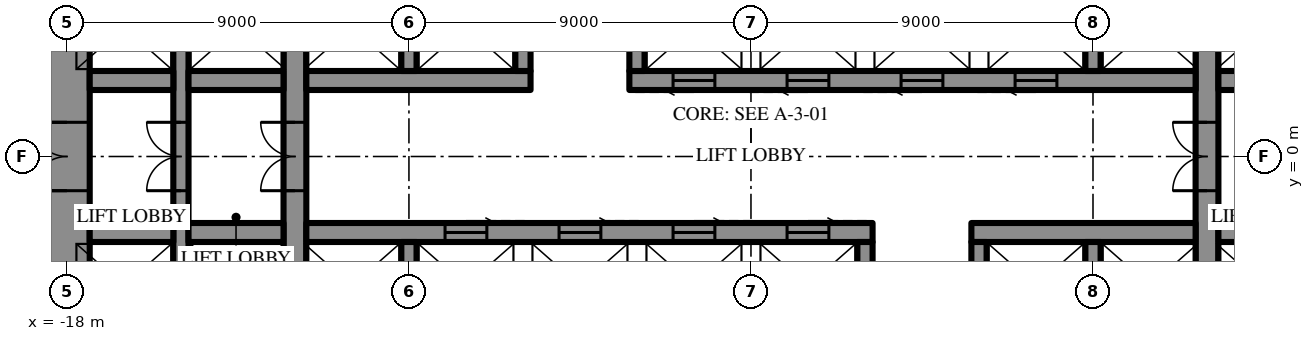
"""IFC4 building model, lengths in metres.
Left out: names, types, materials, properties, quantities, classifications, styles, units other than length and angle.
Written with IfcOpenShell. Run it as: python <this file> out.ifc"""

import sys

from ifc_helpers import new_model, si_unit, direction, frame, frame_2d, origin, place, context, subcontext, project, spatial, rectangle, extrude, element, fill, save


model = new_model("IFC4")
c1 = context("Model", 3, precision=1e-05, world=origin(), true_north=direction((0.0, 1.0)))
c2 = subcontext(c1, "Body", "Model", "MODEL_VIEW")
j1 = project(units=[si_unit("LENGTHUNIT", "METRE"), si_unit("PLANEANGLEUNIT", "RADIAN")], contexts=[c1])
p1 = place(None, origin())
s1 = spatial("IfcSite", under=j1, at=p1, CompositionType="ELEMENT")
p2 = place(p1, origin())
s2 = spatial("IfcBuilding", under=s1, at=p2, CompositionType="ELEMENT")
p3 = place(p2, frame((0.0, 0.0, 44.5)))
s3 = spatial("IfcBuildingStorey", under=s2, at=p3, CompositionType="ELEMENT", Elevation=44.5)
p4 = place(p3, frame((-18.0, 10.7, 0.0), z_axis=(0.0, 0.0, 1.0), x_axis=(0.0, -1.0, 0.0)))
e1 = element("IfcWall", 1, at=p4, inside=s3, PredefinedType="SHEAR", context=c2, shape_type="SweptSolid", body=[
    extrude(rectangle(XDim=21.4, YDim=1.2, at=frame_2d((10.7, 0.0))), origin(), (0.0, 0.0, 1.0), 4.2),
])
p5 = place(p4, frame((9.8, 0.0, 0.0)))
e2 = element("IfcOpeningElement", 2, at=p5, cuts=e1, PredefinedType="OPENING", context=c2, shape_type="SweptSolid", body=[
    extrude(rectangle(XDim=1.8, YDim=2.4, at=frame_2d((0.9, 1.2))), frame((0.0, 0.61, 0.0), z_axis=(0.0, -1.0, 0.0), x_axis=(1.0, 0.0, 0.0)), (0.0, 0.0, 1.0), 1.22),
])
p6 = place(p3, frame((12.0, -10.7, 0.0), z_axis=(0.0, 0.0, 1.0), x_axis=(0.0, 1.0, 0.0)))
e3 = element("IfcWall", 3, at=p6, inside=s3, PredefinedType="SHEAR", context=c2, shape_type="SweptSolid", body=[
    extrude(rectangle(XDim=21.4, YDim=0.6, at=frame_2d((10.7, 0.0))), origin(), (0.0, 0.0, 1.0), 4.2),
])
p7 = place(p6, frame((9.8, 0.0, 0.0)))
e4 = element("IfcOpeningElement", 4, at=p7, cuts=e3, PredefinedType="OPENING", context=c2, shape_type="SweptSolid", body=[
    extrude(rectangle(XDim=1.8, YDim=2.4, at=frame_2d((0.9, 1.2))), frame((0.0, 0.31, 0.0), z_axis=(0.0, -1.0, 0.0), x_axis=(1.0, 0.0, 0.0)), (0.0, 0.0, 1.0), 0.62),
])
p8 = place(p3, frame((-12.0, -10.7, 0.0), z_axis=(0.0, 0.0, 1.0), x_axis=(0.0, 1.0, 0.0)))
e5 = element("IfcWall", 5, at=p8, inside=s3, PredefinedType="SHEAR", context=c2, shape_type="SweptSolid", body=[
    extrude(rectangle(XDim=21.4, YDim=0.6, at=frame_2d((10.7, 0.0))), origin(), (0.0, 0.0, 1.0), 4.2),
])
p9 = place(p8, frame((9.8, 0.0, 0.0)))
e6 = element("IfcOpeningElement", 6, at=p9, cuts=e5, PredefinedType="OPENING", context=c2, shape_type="SweptSolid", body=[
    extrude(rectangle(XDim=1.8, YDim=2.4, at=frame_2d((0.9, 1.2))), frame((0.0, 0.31, 0.0), z_axis=(0.0, -1.0, 0.0), x_axis=(1.0, 0.0, 0.0)), (0.0, 0.0, 1.0), 0.62),
])
p10 = place(p3, frame((-15.0, -10.7, 0.0), z_axis=(0.0, 0.0, 1.0), x_axis=(0.0, 1.0, 0.0)))
e7 = element("IfcWall", 7, at=p10, inside=s3, PredefinedType="SHEAR", context=c2, shape_type="SweptSolid", body=[
    extrude(rectangle(XDim=21.4, YDim=0.4, at=frame_2d((10.7, 0.0))), origin(), (0.0, 0.0, 1.0), 4.2),
])
p11 = place(p10, frame((9.8, 0.0, 0.0)))
e8 = element("IfcOpeningElement", 8, at=p11, cuts=e7, PredefinedType="OPENING", context=c2, shape_type="SweptSolid", body=[
    extrude(rectangle(XDim=1.8, YDim=2.4, at=frame_2d((0.9, 1.2))), frame((0.0, 0.21, 0.0), z_axis=(0.0, -1.0, 0.0), x_axis=(1.0, 0.0, 0.0)), (0.0, 0.0, 1.0), 0.42),
])
p12 = place(p3, frame((-17.4, 2.0, 0.0), z_axis=(0.0, 0.0, 1.0), x_axis=(1.0, 0.0, 0.0)))
e9 = element("IfcWall", 9, at=p12, inside=s3, PredefinedType="SHEAR", context=c2, shape_type="SweptSolid", body=[
    extrude(rectangle(XDim=2.2, YDim=0.5, at=frame_2d((1.1, 0.0))), origin(), (0.0, 0.0, 1.0), 4.2),
])
p13 = place(p3, frame((-14.8, 2.0, 0.0), z_axis=(0.0, 0.0, 1.0), x_axis=(1.0, 0.0, 0.0)))
e10 = element("IfcWall", 10, at=p13, inside=s3, PredefinedType="SHEAR", context=c2, shape_type="SweptSolid", body=[
    extrude(rectangle(XDim=2.5, YDim=0.5, at=frame_2d((1.25, 0.0))), origin(), (0.0, 0.0, 1.0), 4.2),
])
p14 = place(p3, frame((-11.7, 2.0, 0.0), z_axis=(0.0, 0.0, 1.0), x_axis=(1.0, 0.0, 0.0)))
e11 = element("IfcWall", 11, at=p14, inside=s3, PredefinedType="SHEAR", context=c2, shape_type="SweptSolid", body=[
    extrude(rectangle(XDim=5.9, YDim=0.5, at=frame_2d((2.95, 0.0))), origin(), (0.0, 0.0, 1.0), 4.2),
])
p15 = place(p3, frame((-3.2, 2.0, 0.0), z_axis=(0.0, 0.0, 1.0), x_axis=(1.0, 0.0, 0.0)))
e12 = element("IfcWall", 12, at=p15, inside=s3, PredefinedType="SHEAR", context=c2, shape_type="SweptSolid", body=[
    extrude(rectangle(XDim=14.9, YDim=0.5, at=frame_2d((7.45, 0.0))), origin(), (0.0, 0.0, 1.0), 4.2),
])
p16 = place(p15, frame((1.15, 0.0, 0.0)))
e13 = element("IfcOpeningElement", 13, at=p16, cuts=e12, PredefinedType="OPENING", context=c2, shape_type="SweptSolid", body=[
    extrude(rectangle(XDim=1.1, YDim=2.2, at=frame_2d((0.55, 1.1))), frame((0.0, 0.26, 0.0), z_axis=(0.0, -1.0, 0.0), x_axis=(1.0, 0.0, 0.0)), (0.0, 0.0, 1.0), 0.52),
])
p17 = place(p15, frame((4.15, 0.0, 0.0)))
e14 = element("IfcOpeningElement", 14, at=p17, cuts=e12, PredefinedType="OPENING", context=c2, shape_type="SweptSolid", body=[
    extrude(rectangle(XDim=1.1, YDim=2.2, at=frame_2d((0.55, 1.1))), frame((0.0, 0.26, 0.0), z_axis=(0.0, -1.0, 0.0), x_axis=(1.0, 0.0, 0.0)), (0.0, 0.0, 1.0), 0.52),
])
p18 = place(p15, frame((7.15, 0.0, 0.0)))
e15 = element("IfcOpeningElement", 15, at=p18, cuts=e12, PredefinedType="OPENING", context=c2, shape_type="SweptSolid", body=[
    extrude(rectangle(XDim=1.1, YDim=2.2, at=frame_2d((0.55, 1.1))), frame((0.0, 0.26, 0.0), z_axis=(0.0, -1.0, 0.0), x_axis=(1.0, 0.0, 0.0)), (0.0, 0.0, 1.0), 0.52),
])
p19 = place(p15, frame((10.15, 0.0, 0.0)))
e16 = element("IfcOpeningElement", 16, at=p19, cuts=e12, PredefinedType="OPENING", context=c2, shape_type="SweptSolid", body=[
    extrude(rectangle(XDim=1.1, YDim=2.2, at=frame_2d((0.55, 1.1))), frame((0.0, 0.26, 0.0), z_axis=(0.0, -1.0, 0.0), x_axis=(1.0, 0.0, 0.0)), (0.0, 0.0, 1.0), 0.52),
])
p20 = place(p3, frame((12.3, 2.0, 0.0), z_axis=(0.0, 0.0, 1.0), x_axis=(1.0, 0.0, 0.0)))
e17 = element("IfcWall", 17, at=p20, inside=s3, PredefinedType="SHEAR", context=c2, shape_type="SweptSolid", body=[
    extrude(rectangle(XDim=2.5, YDim=0.5, at=frame_2d((1.25, 0.0))), origin(), (0.0, 0.0, 1.0), 4.2),
])
for number, where, z_axis, x_axis in (
    (18, (-9.0, 2.25, 0.0), (0.0, 0.0, 1.0), (0.0, 1.0, 0.0)),
    (19, (-6.0, 2.25, 0.0), (0.0, 0.0, 1.0), (0.0, 1.0, 0.0)),
    (20, (-3.0, 2.25, 0.0), (0.0, 0.0, 1.0), (0.0, 1.0, 0.0)),
    (21, (9.0, 2.25, 0.0), (0.0, 0.0, 1.0), (0.0, 1.0, 0.0)),
):
    element("IfcWall", number, at=place(p3, frame(where, z_axis=z_axis, x_axis=x_axis)), inside=s3, PredefinedType="SHEAR", context=c2, shape_type="SweptSolid", body=[
        extrude(rectangle(XDim=2.3, YDim=0.4, at=frame_2d((1.15, 0.0))), origin(), (0.0, 0.0, 1.0), 4.2),
    ])
p21 = place(p3, frame((14.8, -2.0, 0.0), z_axis=(0.0, 0.0, 1.0), x_axis=(-1.0, 0.0, 0.0)))
e22 = element("IfcWall", 22, at=p21, inside=s3, PredefinedType="SHEAR", context=c2, shape_type="SweptSolid", body=[
    extrude(rectangle(XDim=2.5, YDim=0.5, at=frame_2d((1.25, 0.0))), origin(), (0.0, 0.0, 1.0), 4.2),
])
p22 = place(p3, frame((11.7, -2.0, 0.0), z_axis=(0.0, 0.0, 1.0), x_axis=(-1.0, 0.0, 0.0)))
e23 = element("IfcWall", 23, at=p22, inside=s3, PredefinedType="SHEAR", context=c2, shape_type="SweptSolid", body=[
    extrude(rectangle(XDim=5.9, YDim=0.5, at=frame_2d((2.95, 0.0))), origin(), (0.0, 0.0, 1.0), 4.2),
])
p23 = place(p3, frame((3.2, -2.0, 0.0), z_axis=(0.0, 0.0, 1.0), x_axis=(-1.0, 0.0, 0.0)))
e24 = element("IfcWall", 24, at=p23, inside=s3, PredefinedType="SHEAR", context=c2, shape_type="SweptSolid", body=[
    extrude(rectangle(XDim=14.9, YDim=0.5, at=frame_2d((7.45, 0.0))), origin(), (0.0, 0.0, 1.0), 4.2),
])
p24 = place(p23, frame((1.15, 0.0, 0.0)))
e25 = element("IfcOpeningElement", 25, at=p24, cuts=e24, PredefinedType="OPENING", context=c2, shape_type="SweptSolid", body=[
    extrude(rectangle(XDim=1.1, YDim=2.2, at=frame_2d((0.55, 1.1))), frame((0.0, 0.26, 0.0), z_axis=(0.0, -1.0, 0.0), x_axis=(1.0, 0.0, 0.0)), (0.0, 0.0, 1.0), 0.52),
])
p25 = place(p23, frame((4.15, 0.0, 0.0)))
e26 = element("IfcOpeningElement", 26, at=p25, cuts=e24, PredefinedType="OPENING", context=c2, shape_type="SweptSolid", body=[
    extrude(rectangle(XDim=1.1, YDim=2.2, at=frame_2d((0.55, 1.1))), frame((0.0, 0.26, 0.0), z_axis=(0.0, -1.0, 0.0), x_axis=(1.0, 0.0, 0.0)), (0.0, 0.0, 1.0), 0.52),
])
p26 = place(p23, frame((7.15, 0.0, 0.0)))
e27 = element("IfcOpeningElement", 27, at=p26, cuts=e24, PredefinedType="OPENING", context=c2, shape_type="SweptSolid", body=[
    extrude(rectangle(XDim=1.1, YDim=2.2, at=frame_2d((0.55, 1.1))), frame((0.0, 0.26, 0.0), z_axis=(0.0, -1.0, 0.0), x_axis=(1.0, 0.0, 0.0)), (0.0, 0.0, 1.0), 0.52),
])
p27 = place(p23, frame((10.15, 0.0, 0.0)))
e28 = element("IfcOpeningElement", 28, at=p27, cuts=e24, PredefinedType="OPENING", context=c2, shape_type="SweptSolid", body=[
    extrude(rectangle(XDim=1.1, YDim=2.2, at=frame_2d((0.55, 1.1))), frame((0.0, 0.26, 0.0), z_axis=(0.0, -1.0, 0.0), x_axis=(1.0, 0.0, 0.0)), (0.0, 0.0, 1.0), 0.52),
])
p28 = place(p3, frame((-12.3, -2.0, 0.0), z_axis=(0.0, 0.0, 1.0), x_axis=(-1.0, 0.0, 0.0)))
e29 = element("IfcWall", 29, at=p28, inside=s3, PredefinedType="SHEAR", context=c2, shape_type="SweptSolid", body=[
    extrude(rectangle(XDim=2.5, YDim=0.5, at=frame_2d((1.25, 0.0))), origin(), (0.0, 0.0, 1.0), 4.2),
])
p29 = place(p3, frame((-15.2, -2.0, 0.0), z_axis=(0.0, 0.0, 1.0), x_axis=(-1.0, 0.0, 0.0)))
e30 = element("IfcWall", 30, at=p29, inside=s3, PredefinedType="SHEAR", context=c2, shape_type="SweptSolid", body=[
    extrude(rectangle(XDim=2.2, YDim=0.5, at=frame_2d((1.1, 0.0))), origin(), (0.0, 0.0, 1.0), 4.2),
])
for number, where, z_axis, x_axis in (
    (31, (9.0, -2.25, 0.0), (0.0, 0.0, 1.0), (0.0, -1.0, 0.0)),
    (32, (6.0, -2.25, 0.0), (0.0, 0.0, 1.0), (0.0, -1.0, 0.0)),
    (33, (3.0, -2.25, 0.0), (0.0, 0.0, 1.0), (0.0, -1.0, 0.0)),
    (34, (-9.0, -2.25, 0.0), (0.0, 0.0, 1.0), (0.0, -1.0, 0.0)),
):
    element("IfcWall", number, at=place(p3, frame(where, z_axis=z_axis, x_axis=x_axis)), inside=s3, PredefinedType="SHEAR", context=c2, shape_type="SweptSolid", body=[
        extrude(rectangle(XDim=2.3, YDim=0.4, at=frame_2d((1.15, 0.0))), origin(), (0.0, 0.0, 1.0), 4.2),
    ])
p30 = place(p5, frame((1.8, 0.0, 0.0), z_axis=(0.0, 0.0, 1.0), x_axis=(-1.0, 0.0, 0.0)))
e35 = element("IfcDoor", 35, at=p30, inside=s3, OperationType="DOUBLE_DOOR_SINGLE_SWING", PredefinedType="DOOR", context=c2, shape_type="SweptSolid", body=[
    extrude(rectangle(XDim=1.8, YDim=2.4, at=frame_2d((0.9, 1.2))), frame((0.0, 0.025, 0.0), z_axis=(0.0, -1.0, 0.0), x_axis=(1.0, 0.0, 0.0)), (0.0, 0.0, 1.0), 0.05),
])
fill(e2, e35)
p31 = place(p7, origin())
e36 = element("IfcDoor", 36, at=p31, inside=s3, OperationType="DOUBLE_DOOR_SINGLE_SWING", PredefinedType="DOOR", context=c2, shape_type="SweptSolid", body=[
    extrude(rectangle(XDim=1.8, YDim=2.4, at=frame_2d((0.9, 1.2))), frame((0.0, 0.025, 0.0), z_axis=(0.0, -1.0, 0.0), x_axis=(1.0, 0.0, 0.0)), (0.0, 0.0, 1.0), 0.05),
])
fill(e4, e36)
p32 = place(p9, origin())
e37 = element("IfcDoor", 37, at=p32, inside=s3, OperationType="DOUBLE_DOOR_SINGLE_SWING", PredefinedType="DOOR", context=c2, shape_type="SweptSolid", body=[
    extrude(rectangle(XDim=1.8, YDim=2.4, at=frame_2d((0.9, 1.2))), frame((0.0, 0.025, 0.0), z_axis=(0.0, -1.0, 0.0), x_axis=(1.0, 0.0, 0.0)), (0.0, 0.0, 1.0), 0.05),
])
fill(e6, e37)
p33 = place(p11, origin())
e38 = element("IfcDoor", 38, at=p33, inside=s3, OperationType="DOUBLE_DOOR_SINGLE_SWING", PredefinedType="DOOR", context=c2, shape_type="SweptSolid", body=[
    extrude(rectangle(XDim=1.8, YDim=2.4, at=frame_2d((0.9, 1.2))), frame((0.0, 0.025, 0.0), z_axis=(0.0, -1.0, 0.0), x_axis=(1.0, 0.0, 0.0)), (0.0, 0.0, 1.0), 0.05),
])
fill(e8, e38)
p34 = place(p16, frame((1.1, 0.0, 0.0), z_axis=(0.0, 0.0, 1.0), x_axis=(-1.0, 0.0, 0.0)))
e39 = element("IfcDoor", 39, at=p34, inside=s3, OperationType="SLIDING_TO_LEFT", PredefinedType="DOOR", context=c2, shape_type="SweptSolid", body=[
    extrude(rectangle(XDim=1.1, YDim=2.2, at=frame_2d((0.55, 1.1))), frame((0.0, 0.025, 0.0), z_axis=(0.0, -1.0, 0.0), x_axis=(1.0, 0.0, 0.0)), (0.0, 0.0, 1.0), 0.05),
])
fill(e13, e39)
p35 = place(p17, frame((1.1, 0.0, 0.0), z_axis=(0.0, 0.0, 1.0), x_axis=(-1.0, 0.0, 0.0)))
e40 = element("IfcDoor", 40, at=p35, inside=s3, OperationType="SLIDING_TO_LEFT", PredefinedType="DOOR", context=c2, shape_type="SweptSolid", body=[
    extrude(rectangle(XDim=1.1, YDim=2.2, at=frame_2d((0.55, 1.1))), frame((0.0, 0.025, 0.0), z_axis=(0.0, -1.0, 0.0), x_axis=(1.0, 0.0, 0.0)), (0.0, 0.0, 1.0), 0.05),
])
fill(e14, e40)
p36 = place(p18, frame((1.1, 0.0, 0.0), z_axis=(0.0, 0.0, 1.0), x_axis=(-1.0, 0.0, 0.0)))
e41 = element("IfcDoor", 41, at=p36, inside=s3, OperationType="SLIDING_TO_LEFT", PredefinedType="DOOR", context=c2, shape_type="SweptSolid", body=[
    extrude(rectangle(XDim=1.1, YDim=2.2, at=frame_2d((0.55, 1.1))), frame((0.0, 0.025, 0.0), z_axis=(0.0, -1.0, 0.0), x_axis=(1.0, 0.0, 0.0)), (0.0, 0.0, 1.0), 0.05),
])
fill(e15, e41)
p37 = place(p19, frame((1.1, 0.0, 0.0), z_axis=(0.0, 0.0, 1.0), x_axis=(-1.0, 0.0, 0.0)))
e42 = element("IfcDoor", 42, at=p37, inside=s3, OperationType="SLIDING_TO_LEFT", PredefinedType="DOOR", context=c2, shape_type="SweptSolid", body=[
    extrude(rectangle(XDim=1.1, YDim=2.2, at=frame_2d((0.55, 1.1))), frame((0.0, 0.025, 0.0), z_axis=(0.0, -1.0, 0.0), x_axis=(1.0, 0.0, 0.0)), (0.0, 0.0, 1.0), 0.05),
])
fill(e16, e42)
p38 = place(p24, frame((1.1, 0.0, 0.0), z_axis=(0.0, 0.0, 1.0), x_axis=(-1.0, 0.0, 0.0)))
e43 = element("IfcDoor", 43, at=p38, inside=s3, OperationType="SLIDING_TO_LEFT", PredefinedType="DOOR", context=c2, shape_type="SweptSolid", body=[
    extrude(rectangle(XDim=1.1, YDim=2.2, at=frame_2d((0.55, 1.1))), frame((0.0, 0.025, 0.0), z_axis=(0.0, -1.0, 0.0), x_axis=(1.0, 0.0, 0.0)), (0.0, 0.0, 1.0), 0.05),
])
fill(e25, e43)
p39 = place(p25, frame((1.1, 0.0, 0.0), z_axis=(0.0, 0.0, 1.0), x_axis=(-1.0, 0.0, 0.0)))
e44 = element("IfcDoor", 44, at=p39, inside=s3, OperationType="SLIDING_TO_LEFT", PredefinedType="DOOR", context=c2, shape_type="SweptSolid", body=[
    extrude(rectangle(XDim=1.1, YDim=2.2, at=frame_2d((0.55, 1.1))), frame((0.0, 0.025, 0.0), z_axis=(0.0, -1.0, 0.0), x_axis=(1.0, 0.0, 0.0)), (0.0, 0.0, 1.0), 0.05),
])
fill(e26, e44)
p40 = place(p26, frame((1.1, 0.0, 0.0), z_axis=(0.0, 0.0, 1.0), x_axis=(-1.0, 0.0, 0.0)))
e45 = element("IfcDoor", 45, at=p40, inside=s3, OperationType="SLIDING_TO_LEFT", PredefinedType="DOOR", context=c2, shape_type="SweptSolid", body=[
    extrude(rectangle(XDim=1.1, YDim=2.2, at=frame_2d((0.55, 1.1))), frame((0.0, 0.025, 0.0), z_axis=(0.0, -1.0, 0.0), x_axis=(1.0, 0.0, 0.0)), (0.0, 0.0, 1.0), 0.05),
])
fill(e27, e45)
p41 = place(p27, frame((1.1, 0.0, 0.0), z_axis=(0.0, 0.0, 1.0), x_axis=(-1.0, 0.0, 0.0)))
e46 = element("IfcDoor", 46, at=p41, inside=s3, OperationType="SLIDING_TO_LEFT", PredefinedType="DOOR", context=c2, shape_type="SweptSolid", body=[
    extrude(rectangle(XDim=1.1, YDim=2.2, at=frame_2d((0.55, 1.1))), frame((0.0, 0.025, 0.0), z_axis=(0.0, -1.0, 0.0), x_axis=(1.0, 0.0, 0.0)), (0.0, 0.0, 1.0), 0.05),
])
fill(e28, e46)
save(model, sys.argv[1])
